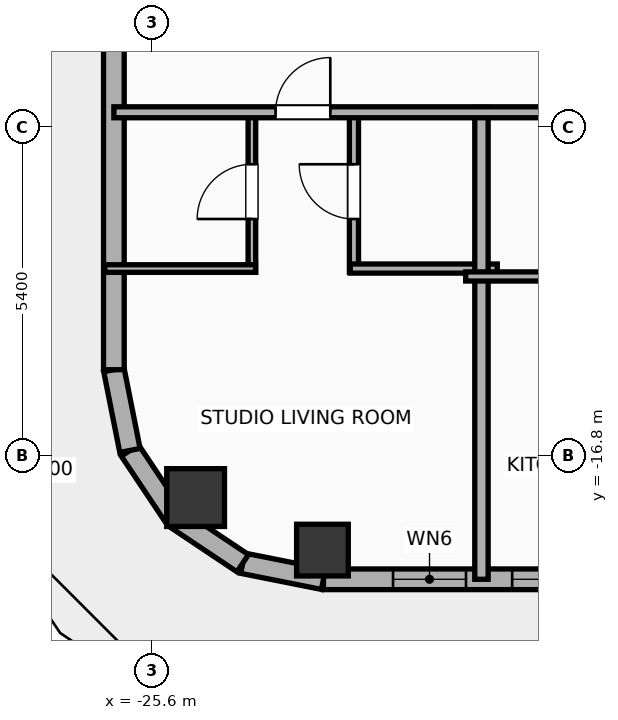
"""IFC4 building model, lengths in metres.
Left out: names, types, materials, properties, quantities, classifications, styles, units other than length and angle.
Written with IfcOpenShell. Run it as: python <this file> out.ifc"""

import sys

from ifc_helpers import new_model, si_unit, direction, frame, frame_2d, origin, origin_2d, place, context, subcontext, project, spatial, rectangle, hollow_rectangle, hollow_circle, extrude, element, fill, save


model = new_model("IFC4")
c1 = context("Model", 3, precision=1e-05, world=origin(), true_north=direction((0.0, 1.0)))
c2 = subcontext(c1, "Body", "Model", "MODEL_VIEW")
j1 = project(units=[si_unit("LENGTHUNIT", "METRE"), si_unit("PLANEANGLEUNIT", "RADIAN")], contexts=[c1])
p1 = place(None, origin())
s1 = spatial("IfcSite", under=j1, at=p1, CompositionType="ELEMENT")
p2 = place(p1, origin())
s2 = spatial("IfcBuilding", under=s1, at=p2, CompositionType="ELEMENT")
p3 = place(p2, frame((0.0, 0.0, 231.4)))
s3 = spatial("IfcBuildingStorey", under=s2, at=p3, CompositionType="ELEMENT", Elevation=231.4)
p4 = place(p3, frame((-22.8, -18.35, 0.0), z_axis=(0.0, 0.0, 1.0), x_axis=(1.0, 0.0, 0.0)))
e1 = element("IfcColumn", 1, at=p4, inside=s3, PredefinedType="COLUMN", context=c2, shape_type="SweptSolid", body=[
    extrude(hollow_rectangle(XDim=0.85, YDim=0.85, WallThickness=0.028, at=origin_2d()), origin(), (0.0, 0.0, 1.0), 3.9),
])
p5 = place(p3, frame((-24.886, -17.486, 0.0), z_axis=(0.0, 0.0, 1.0), x_axis=(1.0, 0.0, 0.0)))
e2 = element("IfcColumn", 2, at=p5, inside=s3, PredefinedType="COLUMN", context=c2, shape_type="SweptSolid", body=[
    extrude(hollow_circle(Radius=0.475, WallThickness=0.032, at=origin_2d()), origin(), (0.0, 0.0, 1.0), 3.9),
])
p6 = place(p3, frame((26.783, -18.83, 0.0), z_axis=(0.0, 0.0, 1.0), x_axis=(-1.0, 0.0, 0.0)))
e3 = element("IfcWall", 3, at=p6, inside=s3, PredefinedType="ELEMENTEDWALL", context=c2, shape_type="SweptSolid", body=[
    extrude(rectangle(XDim=49.566, YDim=0.34, at=frame_2d((24.783, 0.0))), origin(), (0.0, 0.0, 1.0), 3.65),
])
p7 = place(p6, frame((23.583, 0.0, 0.75)))
e4 = element("IfcOpeningElement", 4, at=p7, cuts=e3, PredefinedType="OPENING", context=c2, shape_type="SweptSolid", body=[
    extrude(rectangle(XDim=2.4, YDim=2.1, at=frame_2d((1.2, 1.05))), frame((0.0, 0.18, 0.0), z_axis=(0.0, -1.0, 0.0), x_axis=(1.0, 0.0, 0.0)), (0.0, 0.0, 1.0), 0.36),
])
p8 = place(p6, frame((41.756, 0.0, 0.75)))
e5 = element("IfcOpeningElement", 5, at=p8, cuts=e3, PredefinedType="OPENING", context=c2, shape_type="SweptSolid", body=[
    extrude(rectangle(XDim=2.4, YDim=2.1, at=frame_2d((1.2, 1.05))), frame((0.0, 0.18, 0.0), z_axis=(0.0, -1.0, 0.0), x_axis=(1.0, 0.0, 0.0)), (0.0, 0.0, 1.0), 0.36),
])
p9 = place(p6, frame((47.222, 0.0, 0.75)))
e6 = element("IfcOpeningElement", 6, at=p9, cuts=e3, PredefinedType="OPENING", context=c2, shape_type="SweptSolid", body=[
    extrude(rectangle(XDim=1.2, YDim=2.05, at=frame_2d((0.6, 1.025))), frame((0.0, 0.18, 0.0), z_axis=(0.0, -1.0, 0.0), x_axis=(1.0, 0.0, 0.0)), (0.0, 0.0, 1.0), 0.36),
])
p10 = place(p6, frame((45.263, 0.0, 0.75)))
e7 = element("IfcOpeningElement", 7, at=p10, cuts=e3, PredefinedType="OPENING", context=c2, shape_type="SweptSolid", body=[
    extrude(rectangle(XDim=1.2, YDim=2.05, at=frame_2d((0.6, 1.025))), frame((0.0, 0.18, 0.0), z_axis=(0.0, -1.0, 0.0), x_axis=(1.0, 0.0, 0.0)), (0.0, 0.0, 1.0), 0.36),
])
p11 = place(p6, frame((37.289, 0.0, 0.75)))
e8 = element("IfcOpeningElement", 8, at=p11, cuts=e3, PredefinedType="OPENING", context=c2, shape_type="SweptSolid", body=[
    extrude(rectangle(XDim=1.2, YDim=2.05, at=frame_2d((0.6, 1.025))), frame((0.0, 0.18, 0.0), z_axis=(0.0, -1.0, 0.0), x_axis=(1.0, 0.0, 0.0)), (0.0, 0.0, 1.0), 0.36),
])
p12 = place(p6, frame((16.115, 0.0, 0.75)))
e9 = element("IfcOpeningElement", 9, at=p12, cuts=e3, PredefinedType="OPENING", context=c2, shape_type="SweptSolid", body=[
    extrude(rectangle(XDim=1.2, YDim=2.05, at=frame_2d((0.6, 1.025))), frame((0.0, 0.18, 0.0), z_axis=(0.0, -1.0, 0.0), x_axis=(1.0, 0.0, 0.0)), (0.0, 0.0, 1.0), 0.36),
])
p13 = place(p6, frame((12.422, 0.0, 0.75)))
e10 = element("IfcOpeningElement", 10, at=p13, cuts=e3, PredefinedType="OPENING", context=c2, shape_type="SweptSolid", body=[
    extrude(rectangle(XDim=1.2, YDim=2.05, at=frame_2d((0.6, 1.025))), frame((0.0, 0.18, 0.0), z_axis=(0.0, -1.0, 0.0), x_axis=(1.0, 0.0, 0.0)), (0.0, 0.0, 1.0), 0.36),
])
p14 = place(p6, frame((8.01, 0.0, 0.75)))
e11 = element("IfcOpeningElement", 11, at=p14, cuts=e3, PredefinedType="OPENING", context=c2, shape_type="SweptSolid", body=[
    extrude(rectangle(XDim=1.2, YDim=2.05, at=frame_2d((0.6, 1.025))), frame((0.0, 0.18, 0.0), z_axis=(0.0, -1.0, 0.0), x_axis=(1.0, 0.0, 0.0)), (0.0, 0.0, 1.0), 0.36),
])
p15 = place(p6, frame((5.037, 0.0, 0.75)))
e12 = element("IfcOpeningElement", 12, at=p15, cuts=e3, PredefinedType="OPENING", context=c2, shape_type="SweptSolid", body=[
    extrude(rectangle(XDim=1.2, YDim=2.05, at=frame_2d((0.6, 1.025))), frame((0.0, 0.18, 0.0), z_axis=(0.0, -1.0, 0.0), x_axis=(1.0, 0.0, 0.0)), (0.0, 0.0, 1.0), 0.36),
])
p16 = place(p6, frame((1.811, 0.0, 0.75)))
e13 = element("IfcOpeningElement", 13, at=p16, cuts=e3, PredefinedType="OPENING", context=c2, shape_type="SweptSolid", body=[
    extrude(rectangle(XDim=1.2, YDim=2.05, at=frame_2d((0.6, 1.025))), frame((0.0, 0.18, 0.0), z_axis=(0.0, -1.0, 0.0), x_axis=(1.0, 0.0, 0.0)), (0.0, 0.0, 1.0), 0.36),
])
p17 = place(p6, frame((32.253, 0.0, 0.75)))
e14 = element("IfcOpeningElement", 14, at=p17, cuts=e3, PredefinedType="OPENING", context=c2, shape_type="SweptSolid", body=[
    extrude(rectangle(XDim=1.2, YDim=2.05, at=frame_2d((0.6, 1.025))), frame((0.0, 0.18, 0.0), z_axis=(0.0, -1.0, 0.0), x_axis=(1.0, 0.0, 0.0)), (0.0, 0.0, 1.0), 0.36),
])
p18 = place(p6, frame((27.853, 0.0, 0.75)))
e15 = element("IfcOpeningElement", 15, at=p18, cuts=e3, PredefinedType="OPENING", context=c2, shape_type="SweptSolid", body=[
    extrude(rectangle(XDim=1.2, YDim=2.05, at=frame_2d((0.6, 1.025))), frame((0.0, 0.18, 0.0), z_axis=(0.0, -1.0, 0.0), x_axis=(1.0, 0.0, 0.0)), (0.0, 0.0, 1.0), 0.36),
])
p19 = place(p6, frame((20.473, 0.0, 0.75)))
e16 = element("IfcOpeningElement", 16, at=p19, cuts=e3, PredefinedType="OPENING", context=c2, shape_type="SweptSolid", body=[
    extrude(rectangle(XDim=1.2, YDim=2.05, at=frame_2d((0.6, 1.025))), frame((0.0, 0.18, 0.0), z_axis=(0.0, -1.0, 0.0), x_axis=(1.0, 0.0, 0.0)), (0.0, 0.0, 1.0), 0.36),
])
p20 = place(p3, frame((-22.783, -18.83, 0.0), z_axis=(0.0, 0.0, 1.0), x_axis=(-0.980788153188, 0.195075878998, 0.0)))
e17 = element("IfcWall", 17, at=p20, inside=s3, PredefinedType="ELEMENTEDWALL", context=c2, shape_type="SweptSolid", body=[
    extrude(rectangle(XDim=1.354, YDim=0.34, at=frame_2d((0.677, 0.0))), origin(), (0.0, 0.0, 1.0), 3.65),
])
p21 = place(p3, frame((-24.111, -18.566, 0.0), z_axis=(0.0, 0.0, 1.0), x_axis=(-0.831403586725, 0.555669034571, 0.0)))
e18 = element("IfcWall", 18, at=p21, inside=s3, PredefinedType="ELEMENTEDWALL", context=c2, shape_type="SweptSolid", body=[
    extrude(rectangle(XDim=1.337, YDim=0.34, at=frame_2d((0.668, 0.0))), origin(), (0.0, 0.0, 1.0), 3.65),
])
p22 = place(p3, frame((-25.223, -17.823, 0.0), z_axis=(0.0, 0.0, 1.0), x_axis=(-0.555584683399, 0.831459956686, 0.0)))
e19 = element("IfcWall", 19, at=p22, inside=s3, PredefinedType="ELEMENTEDWALL", context=c2, shape_type="SweptSolid", body=[
    extrude(rectangle(XDim=1.337, YDim=0.34, at=frame_2d((0.668, 0.0))), origin(), (0.0, 0.0, 1.0), 3.65),
])
p23 = place(p3, frame((-25.966, -16.711, 0.0), z_axis=(0.0, 0.0, 1.0), x_axis=(-0.195110379894, 0.98078129043, 0.0)))
e20 = element("IfcWall", 20, at=p23, inside=s3, PredefinedType="ELEMENTEDWALL", context=c2, shape_type="SweptSolid", body=[
    extrude(rectangle(XDim=1.354, YDim=0.34, at=frame_2d((0.677, 0.0))), origin(), (0.0, 0.0, 1.0), 3.65),
])
p24 = place(p3, frame((-26.23, -15.383, 0.0), z_axis=(0.0, 0.0, 1.0), x_axis=(0.0, 1.0, 0.0)))
e21 = element("IfcWall", 21, at=p24, inside=s3, PredefinedType="ELEMENTEDWALL", context=c2, shape_type="SweptSolid", body=[
    extrude(rectangle(XDim=31.967, YDim=0.34, at=frame_2d((15.983, 0.0))), origin(), (0.0, 0.0, 1.0), 3.65),
])
p25 = place(p24, frame((6.242, 0.0, 0.75)))
e22 = element("IfcOpeningElement", 22, at=p25, cuts=e21, PredefinedType="OPENING", context=c2, shape_type="SweptSolid", body=[
    extrude(rectangle(XDim=1.8, YDim=2.1, at=frame_2d((0.9, 1.05))), frame((0.0, 0.18, 0.0), z_axis=(0.0, -1.0, 0.0), x_axis=(1.0, 0.0, 0.0)), (0.0, 0.0, 1.0), 0.36),
])
p26 = place(p24, frame((29.667, 0.0, 0.75)))
e23 = element("IfcOpeningElement", 23, at=p26, cuts=e21, PredefinedType="OPENING", context=c2, shape_type="SweptSolid", body=[
    extrude(rectangle(XDim=1.2, YDim=2.05, at=frame_2d((0.6, 1.025))), frame((0.0, 0.18, 0.0), z_axis=(0.0, -1.0, 0.0), x_axis=(1.0, 0.0, 0.0)), (0.0, 0.0, 1.0), 0.36),
])
p27 = place(p24, frame((20.953, 0.0, 0.75)))
e24 = element("IfcOpeningElement", 24, at=p27, cuts=e21, PredefinedType="OPENING", context=c2, shape_type="SweptSolid", body=[
    extrude(rectangle(XDim=1.2, YDim=2.05, at=frame_2d((0.6, 1.025))), frame((0.0, 0.18, 0.0), z_axis=(0.0, -1.0, 0.0), x_axis=(1.0, 0.0, 0.0)), (0.0, 0.0, 1.0), 0.36),
])
p28 = place(p3, frame((-23.96, -13.78, 0.0), z_axis=(0.0, 0.0, 1.0), x_axis=(0.0, 1.0, 0.0)))
e25 = element("IfcWall", 25, at=p28, inside=s3, PredefinedType="PARTITIONING", context=c2, shape_type="SweptSolid", body=[
    extrude(rectangle(XDim=2.65, YDim=0.125, at=frame_2d((1.325, 0.0))), origin(), (0.0, 0.0, 1.0), 3.65),
])
p29 = place(p28, frame((0.875, 0.0, 0.0)))
e26 = element("IfcOpeningElement", 26, at=p29, cuts=e25, PredefinedType="OPENING", context=c2, shape_type="SweptSolid", body=[
    extrude(rectangle(XDim=0.9, YDim=2.05, at=frame_2d((0.45, 1.025))), frame((0.0, 0.073, 0.0), z_axis=(0.0, -1.0, 0.0), x_axis=(1.0, 0.0, 0.0)), (0.0, 0.0, 1.0), 0.145),
])
p30 = place(p3, frame((-22.282, -13.78, 0.0), z_axis=(0.0, 0.0, 1.0), x_axis=(0.0, 1.0, 0.0)))
e27 = element("IfcWall", 27, at=p30, inside=s3, PredefinedType="PLUMBINGWALL", context=c2, shape_type="SweptSolid", body=[
    extrude(rectangle(XDim=2.65, YDim=0.15, at=frame_2d((1.325, 0.0))), origin(), (0.0, 0.0, 1.0), 3.65),
])
p31 = place(p30, frame((0.875, 0.0, 0.0)))
e28 = element("IfcOpeningElement", 28, at=p31, cuts=e27, PredefinedType="OPENING", context=c2, shape_type="SweptSolid", body=[
    extrude(rectangle(XDim=0.9, YDim=2.05, at=frame_2d((0.45, 1.025))), frame((0.0, 0.085, 0.0), z_axis=(0.0, -1.0, 0.0), x_axis=(1.0, 0.0, 0.0)), (0.0, 0.0, 1.0), 0.17),
])
p32 = place(p3, frame((-26.38, -13.72, 0.0), z_axis=(0.0, 0.0, 1.0), x_axis=(1.0, 0.0, 0.0)))
e29 = element("IfcWall", 29, at=p32, inside=s3, PredefinedType="PARTITIONING", context=c2, shape_type="SweptSolid", body=[
    extrude(rectangle(XDim=2.48, YDim=0.125, at=frame_2d((1.24, 0.0))), origin(), (0.0, 0.0, 1.0), 3.65),
])
p33 = place(p3, frame((-22.342, -13.72, 0.0), z_axis=(0.0, 0.0, 1.0), x_axis=(1.0, 0.0, 0.0)))
e30 = element("IfcWall", 30, at=p33, inside=s3, PredefinedType="PLUMBINGWALL", context=c2, shape_type="SweptSolid", body=[
    extrude(rectangle(XDim=2.417, YDim=0.15, at=frame_2d((1.208, 0.0))), origin(), (0.0, 0.0, 1.0), 3.65),
])
p34 = place(p3, frame((-20.185, -18.83, 0.0), z_axis=(0.0, 0.0, 1.0), x_axis=(0.0, 1.0, 0.0)))
e31 = element("IfcWall", 31, at=p34, inside=s3, PredefinedType="PARTITIONING", context=c2, shape_type="SweptSolid", body=[
    extrude(rectangle(XDim=7.76, YDim=0.22, at=frame_2d((3.88, 0.0))), origin(), (0.0, 0.0, 1.0), 3.65),
])
p35 = place(p3, frame((-20.445, -13.85, 0.0), z_axis=(0.0, 0.0, 1.0), x_axis=(1.0, 0.0, 0.0)))
e32 = element("IfcWall", 32, at=p35, inside=s3, PredefinedType="PLUMBINGWALL", context=c2, shape_type="SweptSolid", body=[
    extrude(rectangle(XDim=2.55, YDim=0.15, at=frame_2d((1.275, 0.0))), origin(), (0.0, 0.0, 1.0), 3.65),
])
p36 = place(p3, frame((-26.23, -11.15, 0.0), z_axis=(0.0, 0.0, 1.0), x_axis=(1.0, 0.0, 0.0)))
e33 = element("IfcWall", 33, at=p36, inside=s3, PredefinedType="PARTITIONING", context=c2, shape_type="SweptSolid", body=[
    extrude(rectangle(XDim=18.15, YDim=0.18, at=frame_2d((9.075, 0.0))), origin(), (0.0, 0.0, 1.0), 3.65),
])
p37 = place(p36, frame((2.659, 0.0, 0.0)))
e34 = element("IfcOpeningElement", 34, at=p37, cuts=e33, PredefinedType="OPENING", context=c2, shape_type="SweptSolid", body=[
    extrude(rectangle(XDim=0.9, YDim=2.05, at=frame_2d((0.45, 1.025))), frame((0.0, 0.1, 0.0), z_axis=(0.0, -1.0, 0.0), x_axis=(1.0, 0.0, 0.0)), (0.0, 0.0, 1.0), 0.2),
])
p38 = place(p36, frame((9.571, 0.0, 0.0)))
e35 = element("IfcOpeningElement", 35, at=p38, cuts=e33, PredefinedType="OPENING", context=c2, shape_type="SweptSolid", body=[
    extrude(rectangle(XDim=1.15, YDim=2.05, at=frame_2d((0.575, 1.025))), frame((0.0, 0.1, 0.0), z_axis=(0.0, -1.0, 0.0), x_axis=(1.0, 0.0, 0.0)), (0.0, 0.0, 1.0), 0.2),
])
p39 = place(p36, frame((14.792, 0.0, 0.0)))
e36 = element("IfcOpeningElement", 36, at=p39, cuts=e33, PredefinedType="OPENING", context=c2, shape_type="SweptSolid", body=[
    extrude(rectangle(XDim=0.9, YDim=2.05, at=frame_2d((0.45, 1.025))), frame((0.0, 0.1, 0.0), z_axis=(0.0, -1.0, 0.0), x_axis=(1.0, 0.0, 0.0)), (0.0, 0.0, 1.0), 0.2),
])
p40 = place(p9, origin())
e37 = element("IfcWindow", 37, at=p40, inside=s3, PartitioningType="SINGLE_PANEL", PredefinedType="WINDOW", context=c2, shape_type="SweptSolid", body=[
    extrude(rectangle(XDim=1.2, YDim=2.05, at=frame_2d((0.6, 1.025))), frame((0.0, 0.03, 0.0), z_axis=(0.0, -1.0, 0.0), x_axis=(1.0, 0.0, 0.0)), (0.0, 0.0, 1.0), 0.06),
])
fill(e6, e37)
p41 = place(p10, origin())
e38 = element("IfcWindow", 38, at=p41, inside=s3, PartitioningType="SINGLE_PANEL", PredefinedType="WINDOW", context=c2, shape_type="SweptSolid", body=[
    extrude(rectangle(XDim=1.2, YDim=2.05, at=frame_2d((0.6, 1.025))), frame((0.0, 0.03, 0.0), z_axis=(0.0, -1.0, 0.0), x_axis=(1.0, 0.0, 0.0)), (0.0, 0.0, 1.0), 0.06),
])
fill(e7, e38)
p42 = place(p29, origin())
e39 = element("IfcDoor", 39, at=p42, inside=s3, OperationType="SINGLE_SWING_LEFT", PredefinedType="DOOR", context=c2, shape_type="SweptSolid", body=[
    extrude(rectangle(XDim=0.9, YDim=2.05, at=frame_2d((0.45, 1.025))), frame((0.0, 0.025, 0.0), z_axis=(0.0, -1.0, 0.0), x_axis=(1.0, 0.0, 0.0)), (0.0, 0.0, 1.0), 0.05),
])
fill(e26, e39)
p43 = place(p31, origin())
e40 = element("IfcDoor", 40, at=p43, inside=s3, OperationType="SINGLE_SWING_RIGHT", PredefinedType="DOOR", context=c2, shape_type="SweptSolid", body=[
    extrude(rectangle(XDim=0.9, YDim=2.05, at=frame_2d((0.45, 1.025))), frame((0.0, 0.025, 0.0), z_axis=(0.0, -1.0, 0.0), x_axis=(1.0, 0.0, 0.0)), (0.0, 0.0, 1.0), 0.05),
])
fill(e28, e40)
p44 = place(p37, origin())
e41 = element("IfcDoor", 41, at=p44, inside=s3, OperationType="SINGLE_SWING_RIGHT", PredefinedType="DOOR", context=c2, shape_type="SweptSolid", body=[
    extrude(rectangle(XDim=0.9, YDim=2.05, at=frame_2d((0.45, 1.025))), frame((0.0, 0.025, 0.0), z_axis=(0.0, -1.0, 0.0), x_axis=(1.0, 0.0, 0.0)), (0.0, 0.0, 1.0), 0.05),
])
fill(e34, e41)
save(model, sys.argv[1])
